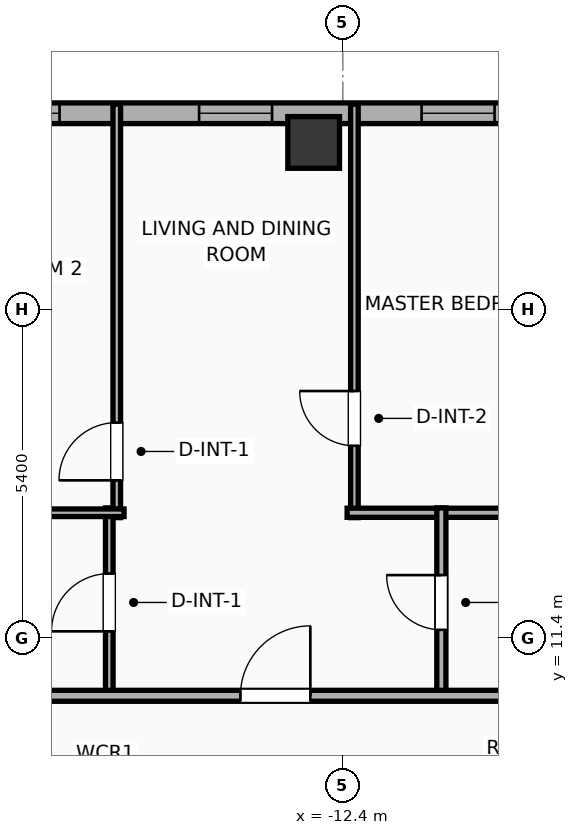
"""IFC4 building model, lengths in metres.
Left out: names, types, materials, properties, quantities, classifications, styles, units other than length and angle.
Written with IfcOpenShell. Run it as: python <this file> out.ifc"""

import sys

from ifc_helpers import new_model, si_unit, direction, frame, frame_2d, origin, origin_2d, place, context, subcontext, project, spatial, rectangle, hollow_rectangle, extrude, element, fill, save


model = new_model("IFC4")
c1 = context("Model", 3, precision=1e-05, world=origin(), true_north=direction((0.0, 1.0)))
c2 = subcontext(c1, "Body", "Model", "MODEL_VIEW")
j1 = project(units=[si_unit("LENGTHUNIT", "METRE"), si_unit("PLANEANGLEUNIT", "RADIAN")], contexts=[c1])
p1 = place(None, origin())
s1 = spatial("IfcSite", under=j1, at=p1, CompositionType="ELEMENT")
p2 = place(p1, origin())
s2 = spatial("IfcBuilding", under=s1, at=p2, CompositionType="ELEMENT")
p3 = place(p2, frame((0.0, 0.0, 250.9)))
s3 = spatial("IfcBuildingStorey", under=s2, at=p3, CompositionType="ELEMENT", Elevation=250.9)
p4 = place(p3, frame((-12.88, 19.55, 0.0), z_axis=(0.0, 0.0, 1.0), x_axis=(1.0, 0.0, 0.0)))
e1 = element("IfcColumn", 1, at=p4, inside=s3, PredefinedType="COLUMN", context=c2, shape_type="SweptSolid", body=[
    extrude(hollow_rectangle(XDim=0.85, YDim=0.85, WallThickness=0.028, at=origin_2d()), origin(), (0.0, 0.0, 1.0), 3.865),
])
p5 = place(p3, frame((-22.783, 20.03, 0.0), z_axis=(0.0, 0.0, 1.0), x_axis=(1.0, 0.0, 0.0)))
e2 = element("IfcWall", 2, at=p5, inside=s3, PredefinedType="ELEMENTEDWALL", context=c2, shape_type="SweptSolid", body=[
    extrude(rectangle(XDim=49.566, YDim=0.34, at=frame_2d((24.783, 0.0))), origin(), (0.0, 0.0, 1.0), 2.39),
])
p6 = place(p5, frame((25.233, 0.0, 0.75)))
e3 = element("IfcOpeningElement", 3, at=p6, cuts=e2, PredefinedType="OPENING", context=c2, shape_type="SweptSolid", body=[
    extrude(rectangle(XDim=2.4, YDim=1.45, at=frame_2d((1.2, 0.725))), frame((0.0, 0.18, 0.0), z_axis=(0.0, -1.0, 0.0), x_axis=(1.0, 0.0, 0.0)), (0.0, 0.0, 1.0), 0.36),
])
p7 = place(p5, frame((41.756, 0.0, 0.75)))
e4 = element("IfcOpeningElement", 4, at=p7, cuts=e2, PredefinedType="OPENING", context=c2, shape_type="SweptSolid", body=[
    extrude(rectangle(XDim=2.4, YDim=1.45, at=frame_2d((1.2, 0.725))), frame((0.0, 0.18, 0.0), z_axis=(0.0, -1.0, 0.0), x_axis=(1.0, 0.0, 0.0)), (0.0, 0.0, 1.0), 0.36),
])
p8 = place(p5, frame((1.637, 0.0, 0.55)))
e5 = element("IfcOpeningElement", 5, at=p8, cuts=e2, PredefinedType="OPENING", context=c2, shape_type="SweptSolid", body=[
    extrude(rectangle(XDim=1.2, YDim=1.15, at=frame_2d((0.6, 0.575))), frame((0.0, 0.18, 0.0), z_axis=(0.0, -1.0, 0.0), x_axis=(1.0, 0.0, 0.0)), (0.0, 0.0, 1.0), 0.36),
])
p9 = place(p5, frame((8.019, 0.0, 0.55)))
e6 = element("IfcOpeningElement", 6, at=p9, cuts=e2, PredefinedType="OPENING", context=c2, shape_type="SweptSolid", body=[
    extrude(rectangle(XDim=1.2, YDim=1.15, at=frame_2d((0.6, 0.575))), frame((0.0, 0.18, 0.0), z_axis=(0.0, -1.0, 0.0), x_axis=(1.0, 0.0, 0.0)), (0.0, 0.0, 1.0), 0.36),
])
p10 = place(p5, frame((4.524, 0.0, 0.55)))
e7 = element("IfcOpeningElement", 7, at=p10, cuts=e2, PredefinedType="OPENING", context=c2, shape_type="SweptSolid", body=[
    extrude(rectangle(XDim=1.2, YDim=1.15, at=frame_2d((0.6, 0.575))), frame((0.0, 0.18, 0.0), z_axis=(0.0, -1.0, 0.0), x_axis=(1.0, 0.0, 0.0)), (0.0, 0.0, 1.0), 0.36),
])
p11 = place(p5, frame((11.678, 0.0, 0.55)))
e8 = element("IfcOpeningElement", 8, at=p11, cuts=e2, PredefinedType="OPENING", context=c2, shape_type="SweptSolid", body=[
    extrude(rectangle(XDim=1.2, YDim=1.15, at=frame_2d((0.6, 0.575))), frame((0.0, 0.18, 0.0), z_axis=(0.0, -1.0, 0.0), x_axis=(1.0, 0.0, 0.0)), (0.0, 0.0, 1.0), 0.36),
])
p12 = place(p5, frame((17.993, 0.0, 0.55)))
e9 = element("IfcOpeningElement", 9, at=p12, cuts=e2, PredefinedType="OPENING", context=c2, shape_type="SweptSolid", body=[
    extrude(rectangle(XDim=1.2, YDim=1.15, at=frame_2d((0.6, 0.575))), frame((0.0, 0.18, 0.0), z_axis=(0.0, -1.0, 0.0), x_axis=(1.0, 0.0, 0.0)), (0.0, 0.0, 1.0), 0.36),
])
p13 = place(p5, frame((15.138, 0.0, 0.55)))
e10 = element("IfcOpeningElement", 10, at=p13, cuts=e2, PredefinedType="OPENING", context=c2, shape_type="SweptSolid", body=[
    extrude(rectangle(XDim=1.2, YDim=1.15, at=frame_2d((0.6, 0.575))), frame((0.0, 0.18, 0.0), z_axis=(0.0, -1.0, 0.0), x_axis=(1.0, 0.0, 0.0)), (0.0, 0.0, 1.0), 0.36),
])
p14 = place(p5, frame((22.278, 0.0, 0.55)))
e11 = element("IfcOpeningElement", 11, at=p14, cuts=e2, PredefinedType="OPENING", context=c2, shape_type="SweptSolid", body=[
    extrude(rectangle(XDim=1.2, YDim=1.15, at=frame_2d((0.6, 0.575))), frame((0.0, 0.18, 0.0), z_axis=(0.0, -1.0, 0.0), x_axis=(1.0, 0.0, 0.0)), (0.0, 0.0, 1.0), 0.36),
])
p15 = place(p5, frame((30.384, 0.0, 0.55)))
e12 = element("IfcOpeningElement", 12, at=p15, cuts=e2, PredefinedType="OPENING", context=c2, shape_type="SweptSolid", body=[
    extrude(rectangle(XDim=0.85, YDim=1.15, at=frame_2d((0.425, 0.575))), frame((0.0, 0.18, 0.0), z_axis=(0.0, -1.0, 0.0), x_axis=(1.0, 0.0, 0.0)), (0.0, 0.0, 1.0), 0.36),
])
p16 = place(p5, frame((32.603, 0.0, 0.55)))
e13 = element("IfcOpeningElement", 13, at=p16, cuts=e2, PredefinedType="OPENING", context=c2, shape_type="SweptSolid", body=[
    extrude(rectangle(XDim=1.2, YDim=1.15, at=frame_2d((0.6, 0.575))), frame((0.0, 0.18, 0.0), z_axis=(0.0, -1.0, 0.0), x_axis=(1.0, 0.0, 0.0)), (0.0, 0.0, 1.0), 0.36),
])
p17 = place(p5, frame((37.223, 0.0, 0.55)))
e14 = element("IfcOpeningElement", 14, at=p17, cuts=e2, PredefinedType="OPENING", context=c2, shape_type="SweptSolid", body=[
    extrude(rectangle(XDim=1.2, YDim=1.15, at=frame_2d((0.6, 0.575))), frame((0.0, 0.18, 0.0), z_axis=(0.0, -1.0, 0.0), x_axis=(1.0, 0.0, 0.0)), (0.0, 0.0, 1.0), 0.36),
])
p18 = place(p5, frame((45.099, 0.0, 0.55)))
e15 = element("IfcOpeningElement", 15, at=p18, cuts=e2, PredefinedType="OPENING", context=c2, shape_type="SweptSolid", body=[
    extrude(rectangle(XDim=1.2, YDim=1.15, at=frame_2d((0.6, 0.575))), frame((0.0, 0.18, 0.0), z_axis=(0.0, -1.0, 0.0), x_axis=(1.0, 0.0, 0.0)), (0.0, 0.0, 1.0), 0.36),
])
p19 = place(p5, frame((47.209, 0.0, 0.55)))
e16 = element("IfcOpeningElement", 16, at=p19, cuts=e2, PredefinedType="OPENING", context=c2, shape_type="SweptSolid", body=[
    extrude(rectangle(XDim=1.2, YDim=1.15, at=frame_2d((0.6, 0.575))), frame((0.0, 0.18, 0.0), z_axis=(0.0, -1.0, 0.0), x_axis=(1.0, 0.0, 0.0)), (0.0, 0.0, 1.0), 0.36),
])
p20 = place(p3, frame((-16.118, 13.38, 0.0), z_axis=(0.0, 0.0, 1.0), x_axis=(0.0, 1.0, 0.0)))
e17 = element("IfcWall", 17, at=p20, inside=s3, PredefinedType="PARTITIONING", context=c2, shape_type="SweptSolid", body=[
    extrude(rectangle(XDim=6.8, YDim=0.125, at=frame_2d((3.4, 0.0))), origin(), (0.0, 0.0, 1.0), 3.5),
])
p21 = place(p20, frame((0.613, 0.0, 0.0)))
e18 = element("IfcOpeningElement", 18, at=p21, cuts=e17, PredefinedType="OPENING", context=c2, shape_type="SweptSolid", body=[
    extrude(rectangle(XDim=0.95, YDim=2.05, at=frame_2d((0.475, 1.025))), frame((0.0, 0.073, 0.0), z_axis=(0.0, -1.0, 0.0), x_axis=(1.0, 0.0, 0.0)), (0.0, 0.0, 1.0), 0.145),
])
p22 = place(p3, frame((-12.21, 13.38, 0.0), z_axis=(0.0, 0.0, 1.0), x_axis=(0.0, 1.0, 0.0)))
e19 = element("IfcWall", 19, at=p22, inside=s3, PredefinedType="PARTITIONING", context=c2, shape_type="SweptSolid", body=[
    extrude(rectangle(XDim=6.8, YDim=0.125, at=frame_2d((3.4, 0.0))), origin(), (0.0, 0.0, 1.0), 2.39),
])
p23 = place(p22, frame((1.182, 0.0, 0.0)))
e20 = element("IfcOpeningElement", 20, at=p23, cuts=e19, PredefinedType="OPENING", context=c2, shape_type="SweptSolid", body=[
    extrude(rectangle(XDim=0.9, YDim=2.05, at=frame_2d((0.45, 1.025))), frame((0.0, 0.073, 0.0), z_axis=(0.0, -1.0, 0.0), x_axis=(1.0, 0.0, 0.0)), (0.0, 0.0, 1.0), 0.145),
])
p24 = place(p3, frame((-12.33, 13.46, 0.0), z_axis=(0.0, 0.0, 1.0), x_axis=(1.0, 0.0, 0.0)))
e21 = element("IfcWall", 21, at=p24, inside=s3, PredefinedType="PLUMBINGWALL", context=c2, shape_type="SweptSolid", body=[
    extrude(rectangle(XDim=3.79, YDim=0.15, at=frame_2d((1.895, 0.0))), origin(), (0.0, 0.0, 1.0), 3.5),
])
p25 = place(p3, frame((-16.241, 10.43, 0.0), z_axis=(0.0, 0.0, 1.0), x_axis=(0.0, 1.0, 0.0)))
e22 = element("IfcWall", 22, at=p25, inside=s3, PredefinedType="PARTITIONING", context=c2, shape_type="SweptSolid", body=[
    extrude(rectangle(XDim=3.11, YDim=0.125, at=frame_2d((1.555, 0.0))), origin(), (0.0, 0.0, 1.0), 3.5),
])
p26 = place(p25, frame((1.08, 0.0, 0.0)))
e23 = element("IfcOpeningElement", 23, at=p26, cuts=e22, PredefinedType="OPENING", context=c2, shape_type="SweptSolid", body=[
    extrude(rectangle(XDim=0.95, YDim=2.05, at=frame_2d((0.475, 1.025))), frame((0.0, 0.073, 0.0), z_axis=(0.0, -1.0, 0.0), x_axis=(1.0, 0.0, 0.0)), (0.0, 0.0, 1.0), 0.145),
])
p27 = place(p3, frame((-19.46, 13.46, 0.0), z_axis=(0.0, 0.0, 1.0), x_axis=(1.0, 0.0, 0.0)))
e24 = element("IfcWall", 24, at=p27, inside=s3, PredefinedType="PARTITIONING", context=c2, shape_type="SweptSolid", body=[
    extrude(rectangle(XDim=3.462, YDim=0.125, at=frame_2d((1.731, 0.0))), origin(), (0.0, 0.0, 1.0), 3.5),
])
p28 = place(p3, frame((-10.78, 10.43, 0.0), z_axis=(0.0, 0.0, 1.0), x_axis=(0.0, 1.0, 0.0)))
e25 = element("IfcWall", 25, at=p28, inside=s3, PredefinedType="PLUMBINGWALL", context=c2, shape_type="SweptSolid", body=[
    extrude(rectangle(XDim=3.11, YDim=0.15, at=frame_2d((1.555, 0.0))), origin(), (0.0, 0.0, 1.0), 3.5),
])
p29 = place(p28, frame((1.105, 0.0, 0.0)))
e26 = element("IfcOpeningElement", 26, at=p29, cuts=e25, PredefinedType="OPENING", context=c2, shape_type="SweptSolid", body=[
    extrude(rectangle(XDim=0.9, YDim=2.05, at=frame_2d((0.45, 1.025))), frame((0.0, 0.085, 0.0), z_axis=(0.0, -1.0, 0.0), x_axis=(1.0, 0.0, 0.0)), (0.0, 0.0, 1.0), 0.17),
])
p30 = place(p3, frame((-26.23, 10.45, 0.0), z_axis=(0.0, 0.0, 1.0), x_axis=(1.0, 0.0, 0.0)))
e27 = element("IfcWall", 27, at=p30, inside=s3, PredefinedType="PARTITIONING", context=c2, shape_type="SweptSolid", body=[
    extrude(rectangle(XDim=56.46, YDim=0.18, at=frame_2d((28.23, 0.0))), origin(), (0.0, 0.0, 1.0), 3.5),
])
p31 = place(p30, frame((3.072, 0.0, 0.0)))
e28 = element("IfcOpeningElement", 28, at=p31, cuts=e27, PredefinedType="OPENING", context=c2, shape_type="SweptSolid", body=[
    extrude(rectangle(XDim=1.15, YDim=2.05, at=frame_2d((0.575, 1.025))), frame((0.0, 0.1, 0.0), z_axis=(0.0, -1.0, 0.0), x_axis=(1.0, 0.0, 0.0)), (0.0, 0.0, 1.0), 0.2),
])
p32 = place(p30, frame((12.146, 0.0, 0.0)))
e29 = element("IfcOpeningElement", 29, at=p32, cuts=e27, PredefinedType="OPENING", context=c2, shape_type="SweptSolid", body=[
    extrude(rectangle(XDim=1.15, YDim=2.05, at=frame_2d((0.575, 1.025))), frame((0.0, 0.1, 0.0), z_axis=(0.0, -1.0, 0.0), x_axis=(1.0, 0.0, 0.0)), (0.0, 0.0, 1.0), 0.2),
])
p33 = place(p30, frame((22.302, 0.0, 0.0)))
e30 = element("IfcOpeningElement", 30, at=p33, cuts=e27, PredefinedType="OPENING", context=c2, shape_type="SweptSolid", body=[
    extrude(rectangle(XDim=1.15, YDim=2.05, at=frame_2d((0.575, 1.025))), frame((0.0, 0.1, 0.0), z_axis=(0.0, -1.0, 0.0), x_axis=(1.0, 0.0, 0.0)), (0.0, 0.0, 1.0), 0.2),
])
p34 = place(p30, frame((32.601, 0.0, 0.0)))
e31 = element("IfcOpeningElement", 31, at=p34, cuts=e27, PredefinedType="OPENING", context=c2, shape_type="SweptSolid", body=[
    extrude(rectangle(XDim=1.15, YDim=2.05, at=frame_2d((0.575, 1.025))), frame((0.0, 0.1, 0.0), z_axis=(0.0, -1.0, 0.0), x_axis=(1.0, 0.0, 0.0)), (0.0, 0.0, 1.0), 0.2),
])
p35 = place(p30, frame((40.941, 0.0, 0.0)))
e32 = element("IfcOpeningElement", 32, at=p35, cuts=e27, PredefinedType="OPENING", context=c2, shape_type="SweptSolid", body=[
    extrude(rectangle(XDim=0.9, YDim=2.05, at=frame_2d((0.45, 1.025))), frame((0.0, 0.1, 0.0), z_axis=(0.0, -1.0, 0.0), x_axis=(1.0, 0.0, 0.0)), (0.0, 0.0, 1.0), 0.2),
])
p36 = place(p30, frame((45.559, 0.0, 0.0)))
e33 = element("IfcOpeningElement", 33, at=p36, cuts=e27, PredefinedType="OPENING", context=c2, shape_type="SweptSolid", body=[
    extrude(rectangle(XDim=1.15, YDim=2.05, at=frame_2d((0.575, 1.025))), frame((0.0, 0.1, 0.0), z_axis=(0.0, -1.0, 0.0), x_axis=(1.0, 0.0, 0.0)), (0.0, 0.0, 1.0), 0.2),
])
p37 = place(p30, frame((53.125, 0.0, 0.0)))
e34 = element("IfcOpeningElement", 34, at=p37, cuts=e27, PredefinedType="OPENING", context=c2, shape_type="SweptSolid", body=[
    extrude(rectangle(XDim=0.9, YDim=2.05, at=frame_2d((0.45, 1.025))), frame((0.0, 0.1, 0.0), z_axis=(0.0, -1.0, 0.0), x_axis=(1.0, 0.0, 0.0)), (0.0, 0.0, 1.0), 0.2),
])
p38 = place(p9, origin())
e35 = element("IfcWindow", 35, at=p38, inside=s3, PartitioningType="SINGLE_PANEL", PredefinedType="WINDOW", context=c2, shape_type="SweptSolid", body=[
    extrude(rectangle(XDim=1.2, YDim=1.15, at=frame_2d((0.6, 0.575))), frame((0.0, 0.03, 0.0), z_axis=(0.0, -1.0, 0.0), x_axis=(1.0, 0.0, 0.0)), (0.0, 0.0, 1.0), 0.06),
])
fill(e6, e35)
p39 = place(p10, origin())
e36 = element("IfcWindow", 36, at=p39, inside=s3, PartitioningType="SINGLE_PANEL", PredefinedType="WINDOW", context=c2, shape_type="SweptSolid", body=[
    extrude(rectangle(XDim=1.2, YDim=1.15, at=frame_2d((0.6, 0.575))), frame((0.0, 0.03, 0.0), z_axis=(0.0, -1.0, 0.0), x_axis=(1.0, 0.0, 0.0)), (0.0, 0.0, 1.0), 0.06),
])
fill(e7, e36)
p40 = place(p11, origin())
e37 = element("IfcWindow", 37, at=p40, inside=s3, PartitioningType="SINGLE_PANEL", PredefinedType="WINDOW", context=c2, shape_type="SweptSolid", body=[
    extrude(rectangle(XDim=1.2, YDim=1.15, at=frame_2d((0.6, 0.575))), frame((0.0, 0.03, 0.0), z_axis=(0.0, -1.0, 0.0), x_axis=(1.0, 0.0, 0.0)), (0.0, 0.0, 1.0), 0.06),
])
fill(e8, e37)
p41 = place(p21, origin())
e38 = element("IfcDoor", 38, at=p41, inside=s3, OperationType="SINGLE_SWING_LEFT", PredefinedType="DOOR", context=c2, shape_type="SweptSolid", body=[
    extrude(rectangle(XDim=0.95, YDim=2.05, at=frame_2d((0.475, 1.025))), frame((0.0, 0.025, 0.0), z_axis=(0.0, -1.0, 0.0), x_axis=(1.0, 0.0, 0.0)), (0.0, 0.0, 1.0), 0.05),
])
fill(e18, e38)
p42 = place(p23, origin())
e39 = element("IfcDoor", 39, at=p42, inside=s3, OperationType="SINGLE_SWING_RIGHT", PredefinedType="DOOR", context=c2, shape_type="SweptSolid", body=[
    extrude(rectangle(XDim=0.9, YDim=2.05, at=frame_2d((0.45, 1.025))), frame((0.0, 0.025, 0.0), z_axis=(0.0, -1.0, 0.0), x_axis=(1.0, 0.0, 0.0)), (0.0, 0.0, 1.0), 0.05),
])
fill(e20, e39)
p43 = place(p26, origin())
e40 = element("IfcDoor", 40, at=p43, inside=s3, OperationType="SINGLE_SWING_LEFT", PredefinedType="DOOR", context=c2, shape_type="SweptSolid", body=[
    extrude(rectangle(XDim=0.95, YDim=2.05, at=frame_2d((0.475, 1.025))), frame((0.0, 0.025, 0.0), z_axis=(0.0, -1.0, 0.0), x_axis=(1.0, 0.0, 0.0)), (0.0, 0.0, 1.0), 0.05),
])
fill(e23, e40)
p44 = place(p29, origin())
e41 = element("IfcDoor", 41, at=p44, inside=s3, OperationType="SINGLE_SWING_RIGHT", PredefinedType="DOOR", context=c2, shape_type="SweptSolid", body=[
    extrude(rectangle(XDim=0.9, YDim=2.05, at=frame_2d((0.45, 1.025))), frame((0.0, 0.025, 0.0), z_axis=(0.0, -1.0, 0.0), x_axis=(1.0, 0.0, 0.0)), (0.0, 0.0, 1.0), 0.05),
])
fill(e26, e41)
p45 = place(p32, origin())
e42 = element("IfcDoor", 42, at=p45, inside=s3, OperationType="SINGLE_SWING_RIGHT", PredefinedType="DOOR", context=c2, shape_type="SweptSolid", body=[
    extrude(rectangle(XDim=1.15, YDim=2.05, at=frame_2d((0.575, 1.025))), frame((0.0, 0.025, 0.0), z_axis=(0.0, -1.0, 0.0), x_axis=(1.0, 0.0, 0.0)), (0.0, 0.0, 1.0), 0.05),
])
fill(e29, e42)
save(model, sys.argv[1])
